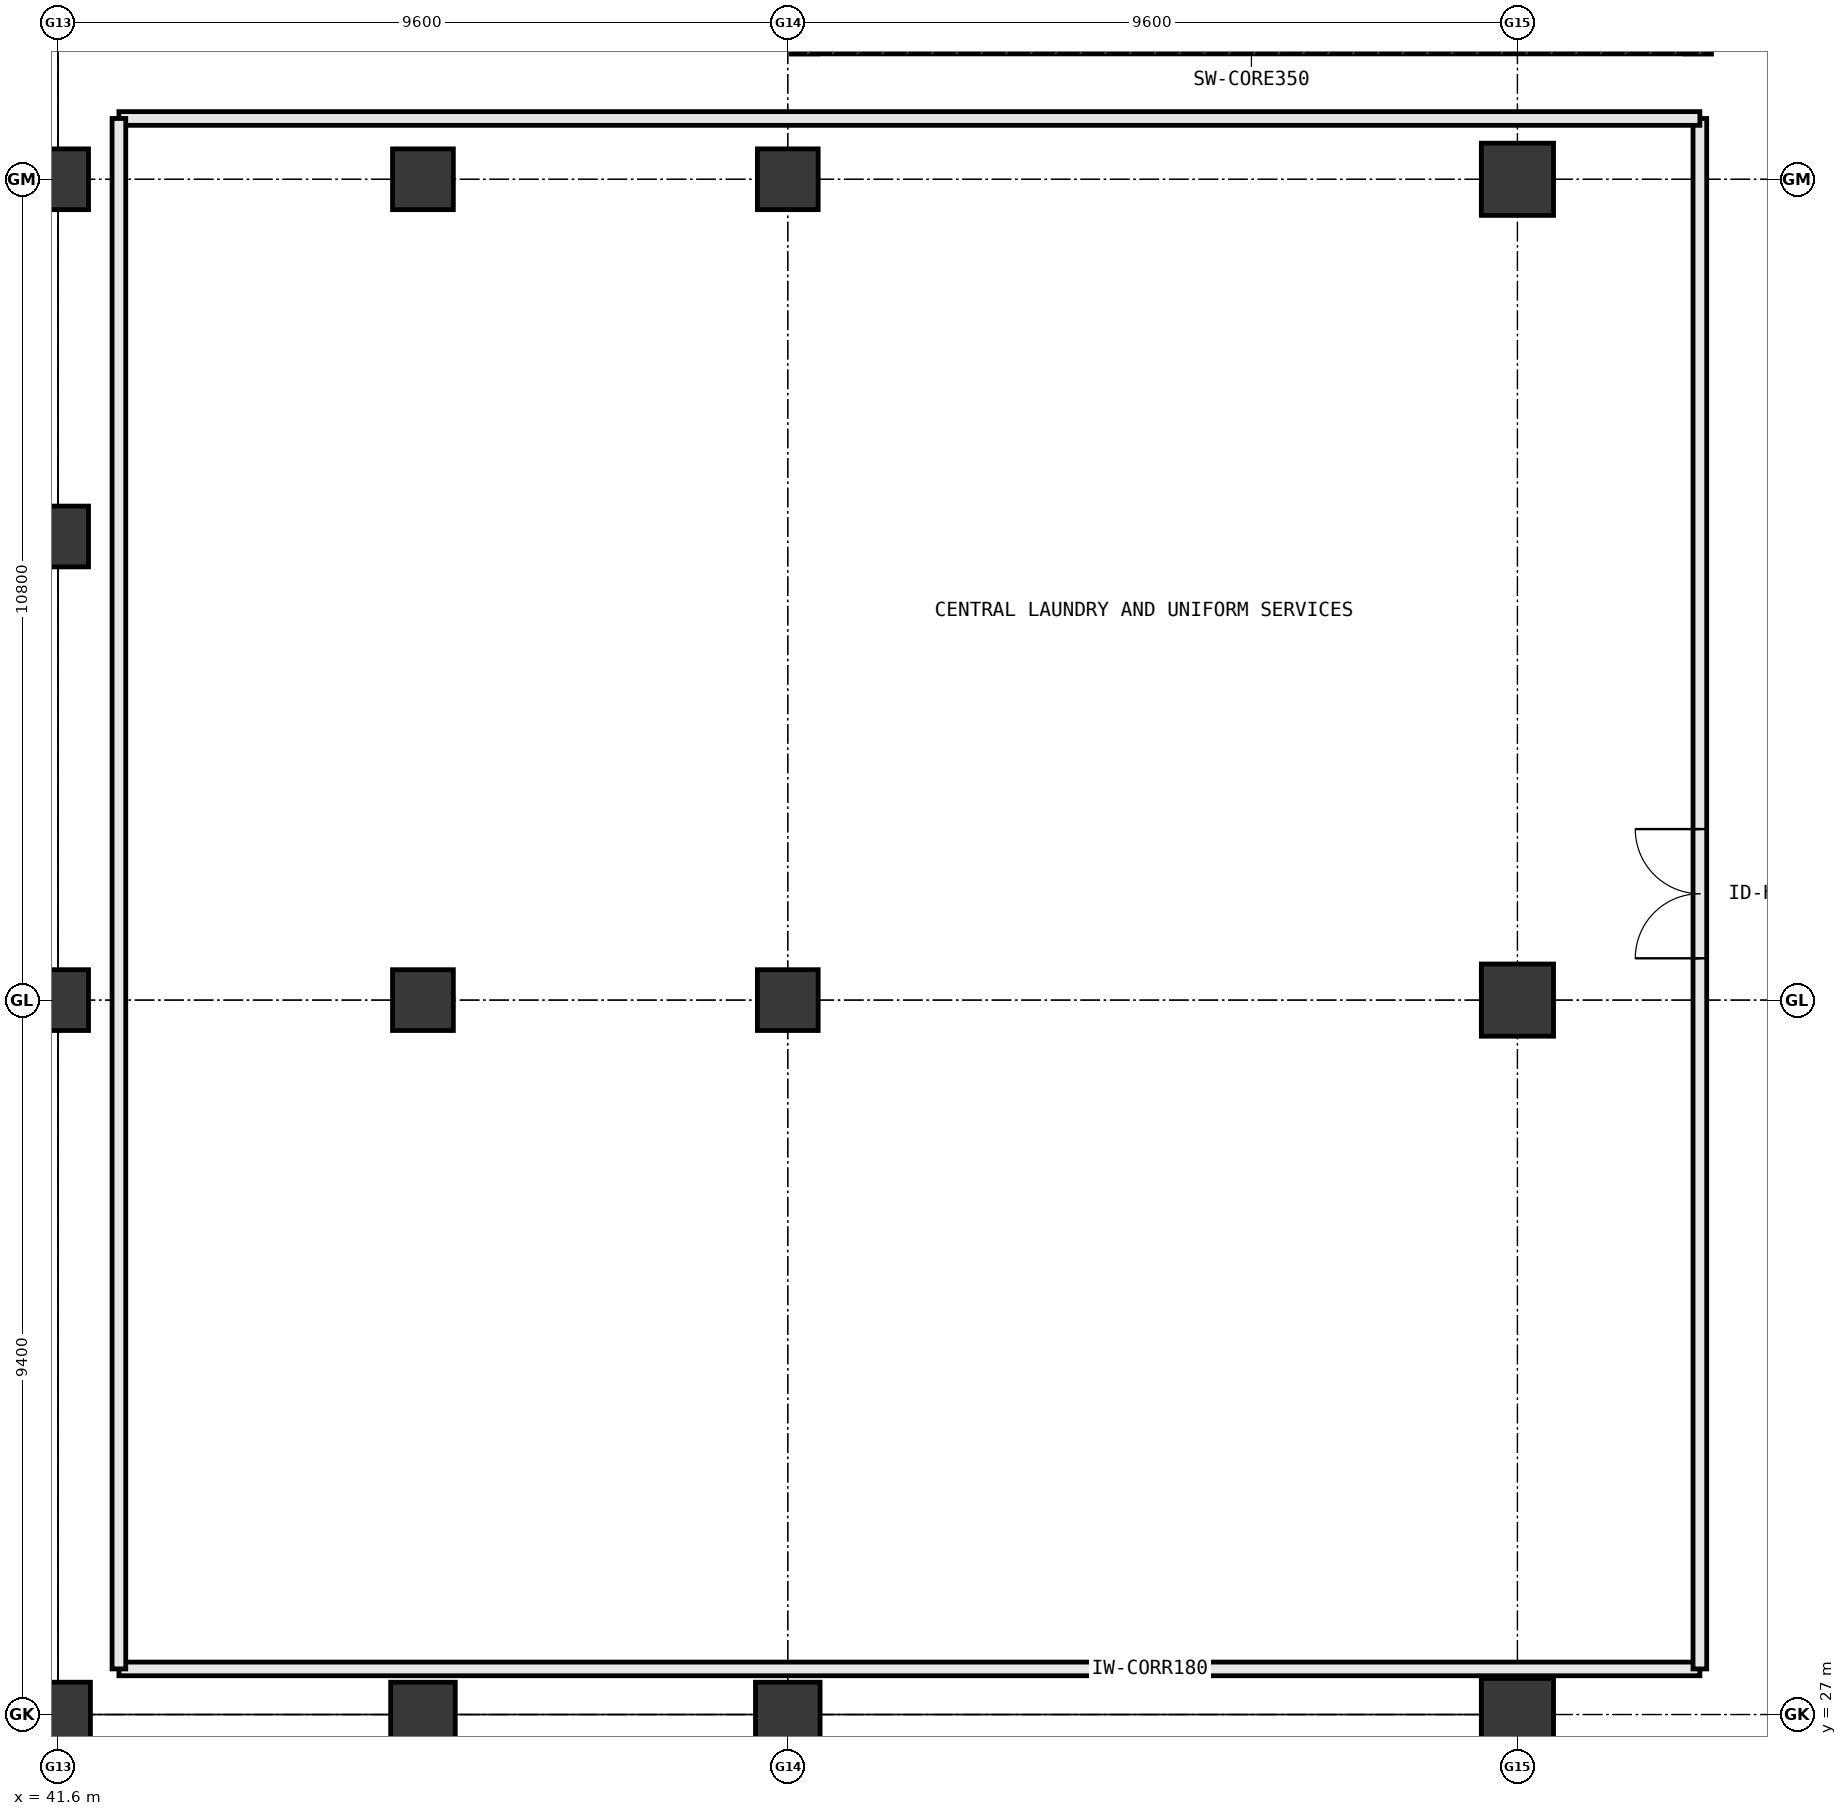
"""IFC4 building model, lengths in metres.
Left out: names, types, materials, properties, quantities, classifications, styles, units other than length and angle.
Written with IfcOpenShell. Run it as: python <this file> out.ifc"""

import sys

from ifc_helpers import new_model, si_unit, direction, frame, frame_2d, origin, origin_2d, place, context, subcontext, project, spatial, rectangle, extrude, element, fill, save


model = new_model("IFC4")
c1 = context("Model", 3, precision=1e-05, world=origin(), true_north=direction((0.0, 1.0)))
c2 = subcontext(c1, "Body", "Model", "MODEL_VIEW")
j1 = project(units=[si_unit("LENGTHUNIT", "METRE"), si_unit("PLANEANGLEUNIT", "RADIAN")], contexts=[c1])
p1 = place(None, origin())
s1 = spatial("IfcSite", under=j1, at=p1, CompositionType="ELEMENT")
p2 = place(p1, origin())
s2 = spatial("IfcBuilding", under=s1, at=p2, CompositionType="ELEMENT")
p3 = place(p2, frame((0.0, 0.0, -4.5)))
s3 = spatial("IfcBuildingStorey", under=s2, at=p3, CompositionType="ELEMENT", Elevation=-4.5)
p4 = place(p3, frame((41.6, 27.0, 0.0), z_axis=(0.0, 0.0, 1.0), x_axis=(1.0, 0.0, 0.0)))
e1 = element("IfcColumn", 1, at=p4, inside=s3, PredefinedType="COLUMN", context=c2, shape_type="SweptSolid", body=[
    extrude(rectangle(XDim=0.85, YDim=0.85, at=origin_2d()), origin(), (0.0, 0.0, 1.0), 4.5),
])
for number, where, z_axis, x_axis in (
    (2, (41.6, 36.4, 0.0), (0.0, 0.0, 1.0), (1.0, 0.0, 0.0)),
    (3, (41.6, 42.5, 0.0), (0.0, 0.0, 1.0), (1.0, 0.0, 0.0)),
    (4, (41.6, 47.2, 0.0), (0.0, 0.0, 1.0), (1.0, 0.0, 0.0)),
):
    element("IfcColumn", number, at=place(p3, frame(where, z_axis=z_axis, x_axis=x_axis)), inside=s3, PredefinedType="COLUMN", context=c2, shape_type="SweptSolid", body=[
        extrude(rectangle(XDim=0.8, YDim=0.8, at=origin_2d()), origin(), (0.0, 0.0, 1.0), 4.5),
    ])
for number, where, z_axis, x_axis in (
    (5, (60.8, 27.0, 0.0), (0.0, 0.0, 1.0), (1.0, 0.0, 0.0)),
    (6, (60.8, 36.4, 0.0), (0.0, 0.0, 1.0), (1.0, 0.0, 0.0)),
    (7, (60.8, 47.2, 0.0), (0.0, 0.0, 1.0), (1.0, 0.0, 0.0)),
):
    element("IfcColumn", number, at=place(p3, frame(where, z_axis=z_axis, x_axis=x_axis)), inside=s3, PredefinedType="COLUMN", context=c2, shape_type="SweptSolid", body=[
        extrude(rectangle(XDim=0.95, YDim=0.95, at=origin_2d()), origin(), (0.0, 0.0, 1.0), 4.5),
    ])
p5 = place(p3, frame((46.4, 27.0, 0.0), z_axis=(0.0, 0.0, 1.0), x_axis=(1.0, 0.0, 0.0)))
e8 = element("IfcColumn", 8, at=p5, inside=s3, PredefinedType="COLUMN", context=c2, shape_type="SweptSolid", body=[
    extrude(rectangle(XDim=0.85, YDim=0.85, at=origin_2d()), origin(), (0.0, 0.0, 1.0), 4.5),
])
for number, where, z_axis, x_axis in (
    (9, (46.4, 36.4, 0.0), (0.0, 0.0, 1.0), (1.0, 0.0, 0.0)),
    (10, (46.4, 47.2, 0.0), (0.0, 0.0, 1.0), (1.0, 0.0, 0.0)),
):
    element("IfcColumn", number, at=place(p3, frame(where, z_axis=z_axis, x_axis=x_axis)), inside=s3, PredefinedType="COLUMN", context=c2, shape_type="SweptSolid", body=[
        extrude(rectangle(XDim=0.8, YDim=0.8, at=origin_2d()), origin(), (0.0, 0.0, 1.0), 4.5),
    ])
p6 = place(p3, frame((51.2, 27.0, 0.0), z_axis=(0.0, 0.0, 1.0), x_axis=(1.0, 0.0, 0.0)))
e11 = element("IfcColumn", 11, at=p6, inside=s3, PredefinedType="COLUMN", context=c2, shape_type="SweptSolid", body=[
    extrude(rectangle(XDim=0.85, YDim=0.85, at=origin_2d()), origin(), (0.0, 0.0, 1.0), 4.5),
])
for number, where, z_axis, x_axis in (
    (12, (51.2, 36.4, 0.0), (0.0, 0.0, 1.0), (1.0, 0.0, 0.0)),
    (13, (51.2, 47.2, 0.0), (0.0, 0.0, 1.0), (1.0, 0.0, 0.0)),
):
    element("IfcColumn", number, at=place(p3, frame(where, z_axis=z_axis, x_axis=x_axis)), inside=s3, PredefinedType="COLUMN", context=c2, shape_type="SweptSolid", body=[
        extrude(rectangle(XDim=0.8, YDim=0.8, at=origin_2d()), origin(), (0.0, 0.0, 1.0), 4.5),
    ])
p7 = place(p3, frame((51.25, 49.025, 0.0), z_axis=(0.0, 0.0, 1.0), x_axis=(1.0, 0.0, 0.0)))
e14 = element("IfcWall", 14, at=p7, inside=s3, PredefinedType="SHEAR", context=c2, shape_type="SweptSolid", body=[
    extrude(rectangle(XDim=12.1, YDim=0.35, at=frame_2d((6.05, 0.0))), origin(), (0.0, 0.0, 1.0), 4.5),
])
p8 = place(p3, frame((63.175, 48.85, 0.0), z_axis=(0.0, 0.0, 1.0), x_axis=(0.0, 1.0, 0.0)))
e15 = element("IfcWall", 15, at=p8, inside=s3, PredefinedType="SHEAR", context=c2, shape_type="SweptSolid", body=[
    extrude(rectangle(XDim=4.5, YDim=0.35, at=frame_2d((2.25, 0.0))), origin(), (0.0, 0.0, 1.0), 4.5),
])
p9 = place(p3, frame((51.425, 53.35, 0.0), z_axis=(0.0, 0.0, 1.0), x_axis=(0.0, -1.0, 0.0)))
e16 = element("IfcWall", 16, at=p9, inside=s3, PredefinedType="SHEAR", context=c2, shape_type="SweptSolid", body=[
    extrude(rectangle(XDim=4.5, YDim=0.35, at=frame_2d((2.25, 0.0))), origin(), (0.0, 0.0, 1.0), 4.5),
])
p10 = place(p9, frame((1.7, 0.0, 0.0)))
e17 = element("IfcOpeningElement", 17, at=p10, cuts=e16, PredefinedType="OPENING", context=c2, shape_type="SweptSolid", body=[
    extrude(rectangle(XDim=1.1, YDim=2.2, at=frame_2d((0.55, 1.1))), frame((0.0, 0.187, 0.0), z_axis=(0.0, -1.0, 0.0), x_axis=(1.0, 0.0, 0.0)), (0.0, 0.0, 1.0), 0.374),
])
p11 = place(p3, frame((42.4, 27.6, 0.0), z_axis=(0.0, 0.0, 1.0), x_axis=(1.0, 0.0, 0.0)))
e18 = element("IfcWall", 18, at=p11, inside=s3, PredefinedType="PARTITIONING", context=c2, shape_type="SweptSolid", body=[
    extrude(rectangle(XDim=20.8, YDim=0.18, at=frame_2d((10.4, 0.0))), origin(), (0.0, 0.0, 1.0), 4.2),
])
p12 = place(p3, frame((63.2, 27.6, 0.0), z_axis=(0.0, 0.0, 1.0), x_axis=(0.0, 1.0, 0.0)))
e19 = element("IfcWall", 19, at=p12, inside=s3, PredefinedType="PARTITIONING", context=c2, shape_type="SweptSolid", body=[
    extrude(rectangle(XDim=20.4, YDim=0.18, at=frame_2d((10.2, 0.0))), origin(), (0.0, 0.0, 1.0), 3.732),
])
p13 = place(p12, frame((9.35, 0.0, 0.0)))
e20 = element("IfcOpeningElement", 20, at=p13, cuts=e19, PredefinedType="OPENING", context=c2, shape_type="SweptSolid", body=[
    extrude(rectangle(XDim=1.7, YDim=2.3, at=frame_2d((0.85, 1.15))), frame((0.0, 0.102, 0.0), z_axis=(0.0, -1.0, 0.0), x_axis=(1.0, 0.0, 0.0)), (0.0, 0.0, 1.0), 0.204),
])
p14 = place(p3, frame((63.2, 48.0, 0.0), z_axis=(0.0, 0.0, 1.0), x_axis=(-1.0, 0.0, 0.0)))
e21 = element("IfcWall", 21, at=p14, inside=s3, PredefinedType="PARTITIONING", context=c2, shape_type="SweptSolid", body=[
    extrude(rectangle(XDim=20.8, YDim=0.18, at=frame_2d((10.4, 0.0))), origin(), (0.0, 0.0, 1.0), 4.2),
])
p15 = place(p3, frame((42.4, 48.0, 0.0), z_axis=(0.0, 0.0, 1.0), x_axis=(0.0, -1.0, 0.0)))
e22 = element("IfcWall", 22, at=p15, inside=s3, PredefinedType="PARTITIONING", context=c2, shape_type="SweptSolid", body=[
    extrude(rectangle(XDim=20.4, YDim=0.18, at=frame_2d((10.2, 0.0))), origin(), (0.0, 0.0, 1.0), 4.2),
])
p16 = place(p13, origin())
e23 = element("IfcDoor", 23, at=p16, inside=s3, OperationType="DOUBLE_DOOR_SINGLE_SWING", PredefinedType="DOOR", context=c2, shape_type="SweptSolid", body=[
    extrude(rectangle(XDim=1.7, YDim=2.3, at=frame_2d((0.85, 1.15))), frame((0.0, 0.025, 0.0), z_axis=(0.0, -1.0, 0.0), x_axis=(1.0, 0.0, 0.0)), (0.0, 0.0, 1.0), 0.05),
])
fill(e20, e23)
save(model, sys.argv[1])
